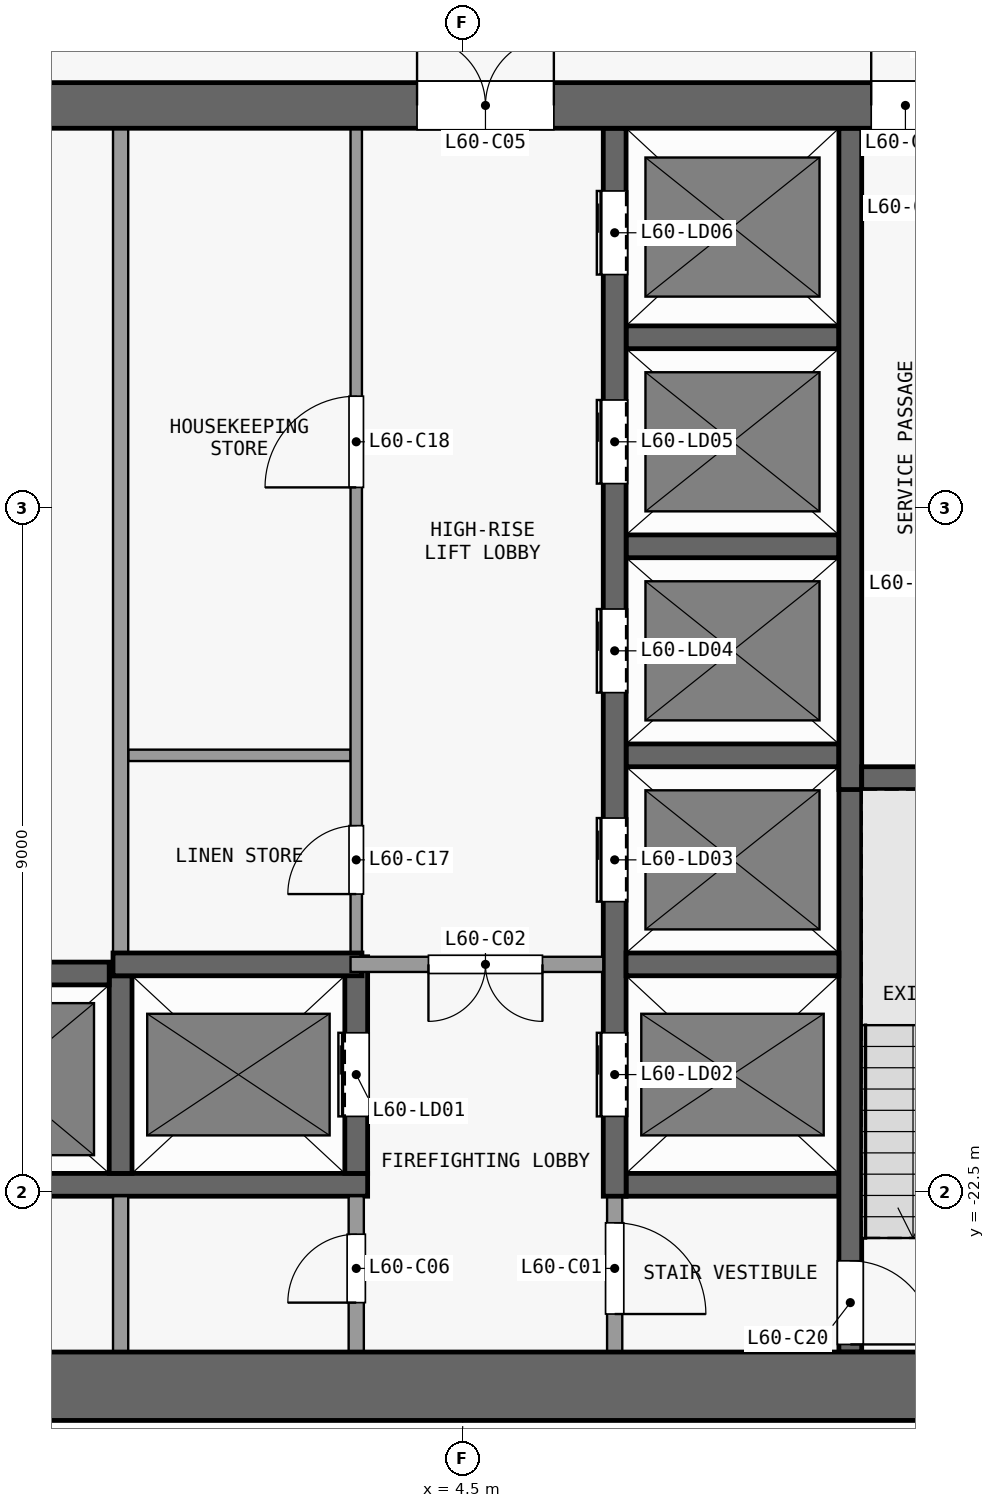
"""IFC4 building model, lengths in metres.
Left out: names, types, materials, properties, quantities, classifications, styles, units other than length and angle.
Written with IfcOpenShell. Run it as: python <this file> out.ifc"""

import sys

from ifc_helpers import new_model, si_unit, direction, frame, frame_2d, origin, place, context, subcontext, project, spatial, rectangle, extrude, element, fill, save


model = new_model("IFC4")
c1 = context("Model", 3, precision=1e-05, world=origin(), true_north=direction((0.0, 1.0)))
c2 = subcontext(c1, "Body", "Model", "MODEL_VIEW")
j1 = project(units=[si_unit("LENGTHUNIT", "METRE"), si_unit("PLANEANGLEUNIT", "RADIAN")], contexts=[c1])
p1 = place(None, origin())
s1 = spatial("IfcSite", under=j1, at=p1, CompositionType="ELEMENT")
p2 = place(p1, origin())
s2 = spatial("IfcBuilding", under=s1, at=p2, CompositionType="ELEMENT")
p3 = place(p2, frame((0.0, 0.0, 237.5)))
s3 = spatial("IfcBuildingStorey", under=s2, at=p3, CompositionType="ELEMENT", Elevation=237.5)
p4 = place(p3, frame((-13.2, -25.05, 0.0), z_axis=(0.0, 0.0, 1.0), x_axis=(1.0, 0.0, 0.0)))
e1 = element("IfcWall", 1, at=p4, inside=s3, PredefinedType="SHEAR", context=c2, shape_type="SweptSolid", body=[
    extrude(rectangle(XDim=26.4, YDim=0.9, at=frame_2d((13.2, 0.0))), origin(), (0.0, 0.0, 1.0), 3.3),
])
p5 = place(p3, frame((-13.2, -8.2, 0.0), z_axis=(0.0, 0.0, 1.0), x_axis=(1.0, 0.0, 0.0)))
e2 = element("IfcWall", 2, at=p5, inside=s3, PredefinedType="SHEAR", context=c2, shape_type="SweptSolid", body=[
    extrude(rectangle(XDim=26.4, YDim=0.6, at=frame_2d((13.2, 0.0))), origin(), (0.0, 0.0, 1.0), 3.3),
])
p6 = place(p5, frame((7.5, 0.0, 0.0)))
e3 = element("IfcOpeningElement", 3, at=p6, cuts=e2, PredefinedType="OPENING", context=c2, shape_type="SweptSolid", body=[
    extrude(rectangle(XDim=1.8, YDim=2.1, at=frame_2d((0.9, 1.05))), frame((0.0, 0.31, 0.0), z_axis=(0.0, -1.0, 0.0), x_axis=(1.0, 0.0, 0.0)), (0.0, 0.0, 1.0), 0.62),
])
p7 = place(p5, frame((17.1, 0.0, 0.0)))
e4 = element("IfcOpeningElement", 4, at=p7, cuts=e2, PredefinedType="OPENING", context=c2, shape_type="SweptSolid", body=[
    extrude(rectangle(XDim=1.8, YDim=2.1, at=frame_2d((0.9, 1.05))), frame((0.0, 0.31, 0.0), z_axis=(0.0, -1.0, 0.0), x_axis=(1.0, 0.0, 0.0)), (0.0, 0.0, 1.0), 0.62),
])
p8 = place(p5, frame((2.425, 0.0, 0.0)))
e5 = element("IfcOpeningElement", 5, at=p8, cuts=e2, PredefinedType="OPENING", context=c2, shape_type="SweptSolid", body=[
    extrude(rectangle(XDim=0.9, YDim=2.1, at=frame_2d((0.45, 1.05))), frame((0.0, 0.31, 0.0), z_axis=(0.0, -1.0, 0.0), x_axis=(1.0, 0.0, 0.0)), (0.0, 0.0, 1.0), 0.62),
])
p9 = place(p5, frame((23.075, 0.0, 0.0)))
e6 = element("IfcOpeningElement", 6, at=p9, cuts=e2, PredefinedType="OPENING", context=c2, shape_type="SweptSolid", body=[
    extrude(rectangle(XDim=0.9, YDim=2.1, at=frame_2d((0.45, 1.05))), frame((0.0, 0.31, 0.0), z_axis=(0.0, -1.0, 0.0), x_axis=(1.0, 0.0, 0.0)), (0.0, 0.0, 1.0), 0.62),
])
p10 = place(p3, frame((-3.25, -22.4, 0.0), z_axis=(0.0, 0.0, 1.0), x_axis=(1.0, 0.0, 0.0)))
e7 = element("IfcWall", 7, at=p10, inside=s3, PredefinedType="SHEAR", context=c2, shape_type="SweptSolid", body=[
    extrude(rectangle(XDim=6.5, YDim=0.3, at=frame_2d((3.25, 0.0))), origin(), (0.0, 0.0, 1.0), 3.3),
])
p11 = place(p3, frame((6.65, -22.4, 0.0), z_axis=(0.0, 0.0, 1.0), x_axis=(1.0, 0.0, 0.0)))
e8 = element("IfcWall", 8, at=p11, inside=s3, PredefinedType="SHEAR", context=c2, shape_type="SweptSolid", body=[
    extrude(rectangle(XDim=2.8, YDim=0.3, at=frame_2d((1.4, 0.0))), origin(), (0.0, 0.0, 1.0), 3.3),
])
p12 = place(p3, frame((-3.2, -19.62, 0.0), z_axis=(0.0, 0.0, 1.0), x_axis=(1.0, 0.0, 0.0)))
e9 = element("IfcWall", 9, at=p12, inside=s3, PredefinedType="SHEAR", context=c2, shape_type="SweptSolid", body=[
    extrude(rectangle(XDim=3.05, YDim=0.3, at=frame_2d((1.525, 0.0))), origin(), (0.0, 0.0, 1.0), 3.3),
])
p13 = place(p3, frame((-0.1, -19.5, 0.0), z_axis=(0.0, 0.0, 1.0), x_axis=(1.0, 0.0, 0.0)))
e10 = element("IfcWall", 10, at=p13, inside=s3, PredefinedType="SHEAR", context=c2, shape_type="SweptSolid", body=[
    extrude(rectangle(XDim=3.275, YDim=0.3, at=frame_2d((1.638, 0.0))), origin(), (0.0, 0.0, 1.0), 3.3),
])
p14 = place(p3, frame((6.35, -19.5, 0.0), z_axis=(0.0, 0.0, 1.0), x_axis=(-1.0, 0.0, 0.0)))
e11 = element("IfcWall", 11, at=p14, inside=s3, PredefinedType="PARTITIONING", context=c2, shape_type="SweptSolid", body=[
    extrude(rectangle(XDim=3.325, YDim=0.2, at=frame_2d((1.663, 0.0))), origin(), (0.0, 0.0, 1.0), 3.3),
])
p15 = place(p14, frame((0.8, 0.0, 0.0)))
e12 = element("IfcOpeningElement", 12, at=p15, cuts=e11, PredefinedType="OPENING", context=c2, shape_type="SweptSolid", body=[
    extrude(rectangle(XDim=1.5, YDim=2.1, at=frame_2d((0.75, 1.05))), frame((0.0, 0.11, 0.0), z_axis=(0.0, -1.0, 0.0), x_axis=(1.0, 0.0, 0.0)), (0.0, 0.0, 1.0), 0.22),
])
p16 = place(p3, frame((6.65, -19.5, 0.0), z_axis=(0.0, 0.0, 1.0), x_axis=(1.0, 0.0, 0.0)))
e13 = element("IfcWall", 13, at=p16, inside=s3, PredefinedType="SHEAR", context=c2, shape_type="SweptSolid", body=[
    extrude(rectangle(XDim=2.8, YDim=0.3, at=frame_2d((1.4, 0.0))), origin(), (0.0, 0.0, 1.0), 3.3),
])
p17 = place(p3, frame((9.75, -17.05, 0.0), z_axis=(0.0, 0.0, 1.0), x_axis=(1.0, 0.0, 0.0)))
e14 = element("IfcWall", 14, at=p17, inside=s3, PredefinedType="SHEAR", context=c2, shape_type="SweptSolid", body=[
    extrude(rectangle(XDim=2.85, YDim=0.3, at=frame_2d((1.425, 0.0))), origin(), (0.0, 0.0, 1.0), 3.3),
])
p18 = place(p3, frame((0.1, -16.75, 0.0), z_axis=(0.0, 0.0, 1.0), x_axis=(1.0, 0.0, 0.0)))
e15 = element("IfcWall", 15, at=p18, inside=s3, PredefinedType="PARTITIONING", context=c2, shape_type="SweptSolid", body=[
    extrude(rectangle(XDim=2.925, YDim=0.15, at=frame_2d((1.462, 0.0))), origin(), (0.0, 0.0, 1.0), 3.3),
])
for number, where, z_axis, x_axis in (
    (16, (6.65, -16.75, 0.0), (0.0, 0.0, 1.0), (1.0, 0.0, 0.0)),
    (17, (6.65, -14.0, 0.0), (0.0, 0.0, 1.0), (1.0, 0.0, 0.0)),
    (18, (6.65, -11.25, 0.0), (0.0, 0.0, 1.0), (1.0, 0.0, 0.0)),
):
    element("IfcWall", number, at=place(p3, frame(where, z_axis=z_axis, x_axis=x_axis)), inside=s3, PredefinedType="SHEAR", context=c2, shape_type="SweptSolid", body=[
        extrude(rectangle(XDim=2.8, YDim=0.3, at=frame_2d((1.4, 0.0))), origin(), (0.0, 0.0, 1.0), 3.3),
    ])
p19 = place(p3, frame((0.0, -24.6, 0.0), z_axis=(0.0, 0.0, 1.0), x_axis=(0.0, 1.0, 0.0)))
e19 = element("IfcWall", 19, at=p19, inside=s3, PredefinedType="PARTITIONING", context=c2, shape_type="SweptSolid", body=[
    extrude(rectangle(XDim=2.05, YDim=0.2, at=frame_2d((1.025, 0.0))), origin(), (0.0, 0.0, 1.0), 3.3),
])
p20 = place(p3, frame((0.0, -22.25, 0.0), z_axis=(0.0, 0.0, 1.0), x_axis=(0.0, 1.0, 0.0)))
e20 = element("IfcWall", 20, at=p20, inside=s3, PredefinedType="SHEAR", context=c2, shape_type="SweptSolid", body=[
    extrude(rectangle(XDim=2.6, YDim=0.3, at=frame_2d((1.3, 0.0))), origin(), (0.0, 0.0, 1.0), 3.3),
])
p21 = place(p3, frame((0.0, -19.35, 0.0), z_axis=(0.0, 0.0, 1.0), x_axis=(0.0, 1.0, 0.0)))
e21 = element("IfcWall", 21, at=p21, inside=s3, PredefinedType="PARTITIONING", context=c2, shape_type="SweptSolid", body=[
    extrude(rectangle(XDim=10.85, YDim=0.2, at=frame_2d((5.425, 0.0))), origin(), (0.0, 0.0, 1.0), 3.3),
])
p22 = place(p3, frame((3.1, -24.6, 0.0), z_axis=(0.0, 0.0, 1.0), x_axis=(0.0, 1.0, 0.0)))
e22 = element("IfcWall", 22, at=p22, inside=s3, PredefinedType="PARTITIONING", context=c2, shape_type="SweptSolid", body=[
    extrude(rectangle(XDim=2.05, YDim=0.2, at=frame_2d((1.025, 0.0))), origin(), (0.0, 0.0, 1.0), 3.3),
])
p23 = place(p22, frame((0.65, 0.0, 0.0)))
e23 = element("IfcOpeningElement", 23, at=p23, cuts=e22, PredefinedType="OPENING", context=c2, shape_type="SweptSolid", body=[
    extrude(rectangle(XDim=0.9, YDim=2.1, at=frame_2d((0.45, 1.05))), frame((0.0, 0.11, 0.0), z_axis=(0.0, -1.0, 0.0), x_axis=(1.0, 0.0, 0.0)), (0.0, 0.0, 1.0), 0.22),
])
p24 = place(p3, frame((3.1, -22.25, 0.0), z_axis=(0.0, 0.0, 1.0), x_axis=(0.0, 1.0, 0.0)))
e24 = element("IfcWall", 24, at=p24, inside=s3, PredefinedType="SHEAR", context=c2, shape_type="SweptSolid", body=[
    extrude(rectangle(XDim=2.85, YDim=0.3, at=frame_2d((1.425, 0.0))), origin(), (0.0, 0.0, 1.0), 3.3),
])
p25 = place(p24, frame((0.75, 0.0, 0.0)))
e25 = element("IfcOpeningElement", 25, at=p25, cuts=e24, PredefinedType="OPENING", context=c2, shape_type="SweptSolid", body=[
    extrude(rectangle(XDim=1.1, YDim=2.1, at=frame_2d((0.55, 1.05))), frame((0.0, 0.16, 0.0), z_axis=(0.0, -1.0, 0.0), x_axis=(1.0, 0.0, 0.0)), (0.0, 0.0, 1.0), 0.32),
])
p26 = place(p3, frame((3.1, -19.4, 0.0), z_axis=(0.0, 0.0, 1.0), x_axis=(0.0, 1.0, 0.0)))
e26 = element("IfcWall", 26, at=p26, inside=s3, PredefinedType="PARTITIONING", context=c2, shape_type="SweptSolid", body=[
    extrude(rectangle(XDim=10.9, YDim=0.15, at=frame_2d((5.45, 0.0))), origin(), (0.0, 0.0, 1.0), 3.3),
])
p27 = place(p26, frame((0.825, 0.0, 0.0)))
e27 = element("IfcOpeningElement", 27, at=p27, cuts=e26, PredefinedType="OPENING", context=c2, shape_type="SweptSolid", body=[
    extrude(rectangle(XDim=0.9, YDim=2.1, at=frame_2d((0.45, 1.05))), frame((0.0, 0.085, 0.0), z_axis=(0.0, -1.0, 0.0), x_axis=(1.0, 0.0, 0.0)), (0.0, 0.0, 1.0), 0.17),
])
p28 = place(p26, frame((6.175, 0.0, 0.0)))
e28 = element("IfcOpeningElement", 28, at=p28, cuts=e26, PredefinedType="OPENING", context=c2, shape_type="SweptSolid", body=[
    extrude(rectangle(XDim=1.2, YDim=2.1, at=frame_2d((0.6, 1.05))), frame((0.0, 0.085, 0.0), z_axis=(0.0, -1.0, 0.0), x_axis=(1.0, 0.0, 0.0)), (0.0, 0.0, 1.0), 0.17),
])
p29 = place(p3, frame((6.5, -22.55, 0.0), z_axis=(0.0, 0.0, 1.0), x_axis=(0.0, -1.0, 0.0)))
e29 = element("IfcWall", 29, at=p29, inside=s3, PredefinedType="PARTITIONING", context=c2, shape_type="SweptSolid", body=[
    extrude(rectangle(XDim=2.05, YDim=0.2, at=frame_2d((1.025, 0.0))), origin(), (0.0, 0.0, 1.0), 3.3),
])
p30 = place(p29, frame((0.35, 0.0, 0.0)))
e30 = element("IfcOpeningElement", 30, at=p30, cuts=e29, PredefinedType="OPENING", context=c2, shape_type="SweptSolid", body=[
    extrude(rectangle(XDim=1.2, YDim=2.1, at=frame_2d((0.6, 1.05))), frame((0.0, 0.11, 0.0), z_axis=(0.0, -1.0, 0.0), x_axis=(1.0, 0.0, 0.0)), (0.0, 0.0, 1.0), 0.22),
])
p31 = place(p3, frame((6.5, -22.55, 0.0), z_axis=(0.0, 0.0, 1.0), x_axis=(0.0, 1.0, 0.0)))
e31 = element("IfcWall", 31, at=p31, inside=s3, PredefinedType="SHEAR", context=c2, shape_type="SweptSolid", body=[
    extrude(rectangle(XDim=14.05, YDim=0.3, at=frame_2d((7.025, 0.0))), origin(), (0.0, 0.0, 1.0), 3.3),
])
p32 = place(p31, frame((1.05, 0.0, 0.0)))
e32 = element("IfcOpeningElement", 32, at=p32, cuts=e31, PredefinedType="OPENING", context=c2, shape_type="SweptSolid", body=[
    extrude(rectangle(XDim=1.1, YDim=2.1, at=frame_2d((0.55, 1.05))), frame((0.0, 0.16, 0.0), z_axis=(0.0, -1.0, 0.0), x_axis=(1.0, 0.0, 0.0)), (0.0, 0.0, 1.0), 0.32),
])
p33 = place(p31, frame((3.875, 0.0, 0.0)))
e33 = element("IfcOpeningElement", 33, at=p33, cuts=e31, PredefinedType="OPENING", context=c2, shape_type="SweptSolid", body=[
    extrude(rectangle(XDim=1.1, YDim=2.1, at=frame_2d((0.55, 1.05))), frame((0.0, 0.16, 0.0), z_axis=(0.0, -1.0, 0.0), x_axis=(1.0, 0.0, 0.0)), (0.0, 0.0, 1.0), 0.32),
])
p34 = place(p31, frame((6.625, 0.0, 0.0)))
e34 = element("IfcOpeningElement", 34, at=p34, cuts=e31, PredefinedType="OPENING", context=c2, shape_type="SweptSolid", body=[
    extrude(rectangle(XDim=1.1, YDim=2.1, at=frame_2d((0.55, 1.05))), frame((0.0, 0.16, 0.0), z_axis=(0.0, -1.0, 0.0), x_axis=(1.0, 0.0, 0.0)), (0.0, 0.0, 1.0), 0.32),
])
p35 = place(p31, frame((9.375, 0.0, 0.0)))
e35 = element("IfcOpeningElement", 35, at=p35, cuts=e31, PredefinedType="OPENING", context=c2, shape_type="SweptSolid", body=[
    extrude(rectangle(XDim=1.1, YDim=2.1, at=frame_2d((0.55, 1.05))), frame((0.0, 0.16, 0.0), z_axis=(0.0, -1.0, 0.0), x_axis=(1.0, 0.0, 0.0)), (0.0, 0.0, 1.0), 0.32),
])
p36 = place(p31, frame((12.125, 0.0, 0.0)))
e36 = element("IfcOpeningElement", 36, at=p36, cuts=e31, PredefinedType="OPENING", context=c2, shape_type="SweptSolid", body=[
    extrude(rectangle(XDim=1.1, YDim=2.1, at=frame_2d((0.55, 1.05))), frame((0.0, 0.16, 0.0), z_axis=(0.0, -1.0, 0.0), x_axis=(1.0, 0.0, 0.0)), (0.0, 0.0, 1.0), 0.32),
])
p37 = place(p3, frame((9.6, -16.9, 0.0), z_axis=(0.0, 0.0, 1.0), x_axis=(0.0, -1.0, 0.0)))
e37 = element("IfcWall", 37, at=p37, inside=s3, PredefinedType="SHEAR", context=c2, shape_type="SweptSolid", body=[
    extrude(rectangle(XDim=7.7, YDim=0.3, at=frame_2d((3.85, 0.0))), origin(), (0.0, 0.0, 1.0), 3.3),
])
p38 = place(p37, frame((6.5, 0.0, 0.0)))
e38 = element("IfcOpeningElement", 38, at=p38, cuts=e37, PredefinedType="OPENING", context=c2, shape_type="SweptSolid", body=[
    extrude(rectangle(XDim=1.1, YDim=2.1, at=frame_2d((0.55, 1.05))), frame((0.0, 0.16, 0.0), z_axis=(0.0, -1.0, 0.0), x_axis=(1.0, 0.0, 0.0)), (0.0, 0.0, 1.0), 0.32),
])
p39 = place(p3, frame((9.6, -17.2, 0.0), z_axis=(0.0, 0.0, 1.0), x_axis=(0.0, 1.0, 0.0)))
e39 = element("IfcWall", 39, at=p39, inside=s3, PredefinedType="SHEAR", context=c2, shape_type="SweptSolid", body=[
    extrude(rectangle(XDim=8.7, YDim=0.3, at=frame_2d((4.35, 0.0))), origin(), (0.0, 0.0, 1.0), 3.3),
])
p40 = place(p25, origin())
e40 = element("IfcDoor", 40, at=p40, inside=s3, OperationType="DOUBLE_DOOR_SLIDING", PredefinedType="DOOR", context=c2, shape_type="SweptSolid", body=[
    extrude(rectangle(XDim=1.1, YDim=2.1, at=frame_2d((0.55, 1.05))), frame((0.0, 0.025, 0.0), z_axis=(0.0, -1.0, 0.0), x_axis=(1.0, 0.0, 0.0)), (0.0, 0.0, 1.0), 0.05),
])
fill(e25, e40)
p41 = place(p32, origin())
e41 = element("IfcDoor", 41, at=p41, inside=s3, OperationType="DOUBLE_DOOR_SLIDING", PredefinedType="DOOR", context=c2, shape_type="SweptSolid", body=[
    extrude(rectangle(XDim=1.1, YDim=2.1, at=frame_2d((0.55, 1.05))), frame((0.0, 0.025, 0.0), z_axis=(0.0, -1.0, 0.0), x_axis=(1.0, 0.0, 0.0)), (0.0, 0.0, 1.0), 0.05),
])
fill(e32, e41)
p42 = place(p33, origin())
e42 = element("IfcDoor", 42, at=p42, inside=s3, OperationType="DOUBLE_DOOR_SLIDING", PredefinedType="DOOR", context=c2, shape_type="SweptSolid", body=[
    extrude(rectangle(XDim=1.1, YDim=2.1, at=frame_2d((0.55, 1.05))), frame((0.0, 0.025, 0.0), z_axis=(0.0, -1.0, 0.0), x_axis=(1.0, 0.0, 0.0)), (0.0, 0.0, 1.0), 0.05),
])
fill(e33, e42)
p43 = place(p34, origin())
e43 = element("IfcDoor", 43, at=p43, inside=s3, OperationType="DOUBLE_DOOR_SLIDING", PredefinedType="DOOR", context=c2, shape_type="SweptSolid", body=[
    extrude(rectangle(XDim=1.1, YDim=2.1, at=frame_2d((0.55, 1.05))), frame((0.0, 0.025, 0.0), z_axis=(0.0, -1.0, 0.0), x_axis=(1.0, 0.0, 0.0)), (0.0, 0.0, 1.0), 0.05),
])
fill(e34, e43)
p44 = place(p35, origin())
e44 = element("IfcDoor", 44, at=p44, inside=s3, OperationType="DOUBLE_DOOR_SLIDING", PredefinedType="DOOR", context=c2, shape_type="SweptSolid", body=[
    extrude(rectangle(XDim=1.1, YDim=2.1, at=frame_2d((0.55, 1.05))), frame((0.0, 0.025, 0.0), z_axis=(0.0, -1.0, 0.0), x_axis=(1.0, 0.0, 0.0)), (0.0, 0.0, 1.0), 0.05),
])
fill(e35, e44)
p45 = place(p36, origin())
e45 = element("IfcDoor", 45, at=p45, inside=s3, OperationType="DOUBLE_DOOR_SLIDING", PredefinedType="DOOR", context=c2, shape_type="SweptSolid", body=[
    extrude(rectangle(XDim=1.1, YDim=2.1, at=frame_2d((0.55, 1.05))), frame((0.0, 0.025, 0.0), z_axis=(0.0, -1.0, 0.0), x_axis=(1.0, 0.0, 0.0)), (0.0, 0.0, 1.0), 0.05),
])
fill(e36, e45)
p46 = place(p30, origin())
e46 = element("IfcDoor", 46, at=p46, inside=s3, OperationType="SINGLE_SWING_RIGHT", PredefinedType="DOOR", context=c2, shape_type="SweptSolid", body=[
    extrude(rectangle(XDim=1.2, YDim=2.1, at=frame_2d((0.6, 1.05))), frame((0.0, 0.025, 0.0), z_axis=(0.0, -1.0, 0.0), x_axis=(1.0, 0.0, 0.0)), (0.0, 0.0, 1.0), 0.05),
])
fill(e30, e46)
p47 = place(p15, origin())
e47 = element("IfcDoor", 47, at=p47, inside=s3, OperationType="DOUBLE_DOOR_SINGLE_SWING", PredefinedType="DOOR", context=c2, shape_type="SweptSolid", body=[
    extrude(rectangle(XDim=1.5, YDim=2.1, at=frame_2d((0.75, 1.05))), frame((0.0, 0.025, 0.0), z_axis=(0.0, -1.0, 0.0), x_axis=(1.0, 0.0, 0.0)), (0.0, 0.0, 1.0), 0.05),
])
fill(e12, e47)
p48 = place(p7, origin())
e48 = element("IfcDoor", 48, at=p48, inside=s3, OperationType="DOUBLE_DOOR_SINGLE_SWING", PredefinedType="DOOR", context=c2, shape_type="SweptSolid", body=[
    extrude(rectangle(XDim=1.8, YDim=2.1, at=frame_2d((0.9, 1.05))), frame((0.0, 0.025, 0.0), z_axis=(0.0, -1.0, 0.0), x_axis=(1.0, 0.0, 0.0)), (0.0, 0.0, 1.0), 0.05),
])
fill(e4, e48)
p49 = place(p23, origin())
e49 = element("IfcDoor", 49, at=p49, inside=s3, OperationType="SINGLE_SWING_LEFT", PredefinedType="DOOR", context=c2, shape_type="SweptSolid", body=[
    extrude(rectangle(XDim=0.9, YDim=2.1, at=frame_2d((0.45, 1.05))), frame((0.0, 0.025, 0.0), z_axis=(0.0, -1.0, 0.0), x_axis=(1.0, 0.0, 0.0)), (0.0, 0.0, 1.0), 0.05),
])
fill(e23, e49)
p50 = place(p9, origin())
e50 = element("IfcDoor", 50, at=p50, inside=s3, OperationType="SINGLE_SWING_LEFT", PredefinedType="DOOR", context=c2, shape_type="SweptSolid", body=[
    extrude(rectangle(XDim=0.9, YDim=2.1, at=frame_2d((0.45, 1.05))), frame((0.0, 0.025, 0.0), z_axis=(0.0, -1.0, 0.0), x_axis=(1.0, 0.0, 0.0)), (0.0, 0.0, 1.0), 0.05),
])
fill(e6, e50)
p51 = place(p27, origin())
e51 = element("IfcDoor", 51, at=p51, inside=s3, OperationType="SINGLE_SWING_LEFT", PredefinedType="DOOR", context=c2, shape_type="SweptSolid", body=[
    extrude(rectangle(XDim=0.9, YDim=2.1, at=frame_2d((0.45, 1.05))), frame((0.0, 0.025, 0.0), z_axis=(0.0, -1.0, 0.0), x_axis=(1.0, 0.0, 0.0)), (0.0, 0.0, 1.0), 0.05),
])
fill(e27, e51)
p52 = place(p28, origin())
e52 = element("IfcDoor", 52, at=p52, inside=s3, OperationType="SINGLE_SWING_LEFT", PredefinedType="DOOR", context=c2, shape_type="SweptSolid", body=[
    extrude(rectangle(XDim=1.2, YDim=2.1, at=frame_2d((0.6, 1.05))), frame((0.0, 0.025, 0.0), z_axis=(0.0, -1.0, 0.0), x_axis=(1.0, 0.0, 0.0)), (0.0, 0.0, 1.0), 0.05),
])
fill(e28, e52)
p53 = place(p38, origin())
e53 = element("IfcDoor", 53, at=p53, inside=s3, OperationType="SINGLE_SWING_RIGHT", PredefinedType="DOOR", context=c2, shape_type="SweptSolid", body=[
    extrude(rectangle(XDim=1.1, YDim=2.1, at=frame_2d((0.55, 1.05))), frame((0.0, 0.025, 0.0), z_axis=(0.0, -1.0, 0.0), x_axis=(1.0, 0.0, 0.0)), (0.0, 0.0, 1.0), 0.05),
])
fill(e38, e53)
save(model, sys.argv[1])
